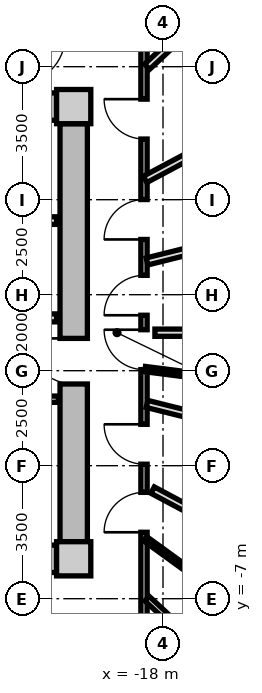
"""IFC4 building model, lengths in metres.
Left out: names, types, materials, properties, quantities, classifications, styles, units other than length and angle.
Written with IfcOpenShell. Run it as: python <this file> out.ifc"""

import sys

from ifc_helpers import new_model, si_unit, direction, frame, frame_2d, origin, origin_2d, place, context, subcontext, project, spatial, rectangle, extrude, source, transform, mapped, element, fill, save


model = new_model("IFC4")
c1 = context("Model", 3, precision=1e-05, world=origin(), true_north=direction((0.0, 1.0)))
c2 = subcontext(c1, "Body", "Model", "MODEL_VIEW")
j1 = project(units=[si_unit("LENGTHUNIT", "METRE"), si_unit("PLANEANGLEUNIT", "RADIAN")], contexts=[c1])
p1 = place(None, origin())
s1 = spatial("IfcSite", under=j1, at=p1, CompositionType="ELEMENT")
p2 = place(p1, origin())
s2 = spatial("IfcBuilding", under=s1, at=p2, CompositionType="ELEMENT")
p3 = place(p2, frame((0.0, 0.0, 126.75)))
s3 = spatial("IfcBuildingStorey", under=s2, at=p3, CompositionType="ELEMENT", Elevation=126.75)
m1 = source(origin(), c2, "Body", "SweptSolid", [
    extrude(rectangle(XDim=0.9, YDim=0.9, at=origin_2d()), origin(), (0.0, 0.0, 1.0), 3.05),
])
for number, where, z_axis, x_axis in (
    (1, (-20.35, -5.95, 0.0), (0.0, 0.0, 1.0), (1.0, 0.0, 0.0)),
    (2, (-20.35, 5.95, 0.0), (0.0, 0.0, 1.0), (1.0, 0.0, 0.0)),
):
    element("IfcColumn", number, at=place(p3, frame(where, z_axis=z_axis, x_axis=x_axis)), inside=s3, PredefinedType="COLUMN", context=c2, shape_type="MappedRepresentation", body=[
        mapped(m1, transform((0.0, 0.0, 0.0), x_axis=(1.0, 0.0, 0.0), y_axis=(0.0, 1.0, 0.0), z_axis=(0.0, 0.0, 1.0), scale=1.0)),
    ])
m2 = source(origin(), c2, "Body", "SweptSolid", [
    extrude(rectangle(XDim=14.4, YDim=0.72, at=frame_2d((7.2, 0.0))), origin(), (0.0, 0.0, 1.0), 2.73),
])
for number, where, z_axis, x_axis in (
    (3, (-35.2, 5.95, 0.0), (0.0, 0.0, 1.0), (1.0, 0.0, 0.0)),
    (4, (-20.8, -5.95, 0.0), (0.0, 0.0, 1.0), (-1.0, 0.0, 0.0)),
):
    element("IfcWall", number, at=place(p3, frame(where, z_axis=z_axis, x_axis=x_axis)), inside=s3, PredefinedType="SHEAR", context=c2, shape_type="MappedRepresentation", body=[
        mapped(m2, transform((0.0, 0.0, 0.0), x_axis=(1.0, 0.0, 0.0), y_axis=(0.0, 1.0, 0.0), z_axis=(0.0, 0.0, 1.0), scale=1.0)),
    ])
m3 = source(origin(), c2, "Body", "SweptSolid", [
    extrude(rectangle(XDim=11.0, YDim=0.72, at=frame_2d((5.5, 0.0))), origin(), (0.0, 0.0, 1.0), 2.73),
])
p4 = place(p3, frame((-20.35, 5.5, 0.0), z_axis=(0.0, 0.0, 1.0), x_axis=(0.0, -1.0, 0.0)))
e5 = element("IfcWall", 5, at=p4, inside=s3, PredefinedType="SHEAR", context=c2, shape_type="MappedRepresentation", body=[
    mapped(m3, transform((0.0, 0.0, 0.0), x_axis=(1.0, 0.0, 0.0), y_axis=(0.0, 1.0, 0.0), z_axis=(0.0, 0.0, 1.0), scale=1.0)),
])
p5 = place(p4, frame((5.65, 0.0, 0.0)))
e6 = element("IfcOpeningElement", 6, at=p5, cuts=e5, PredefinedType="OPENING", context=c2, shape_type="SweptSolid", body=[
    extrude(rectangle(XDim=1.2, YDim=2.15, at=frame_2d((0.6, 1.075))), frame((0.0, 0.37, 0.0), z_axis=(0.0, -1.0, 0.0), x_axis=(1.0, 0.0, 0.0)), (0.0, 0.0, 1.0), 0.74),
])
m4 = source(origin(), c2, "Body", "SweptSolid", [
    extrude(rectangle(XDim=3.2, YDim=0.2, at=frame_2d((1.6, 0.0))), origin(), (0.0, 0.0, 1.0), 2.715),
])
p6 = place(p3, frame((-24.0, 2.95, 0.0), z_axis=(0.0, 0.0, 1.0), x_axis=(1.0, 0.0, 0.0)))
e7 = element("IfcWall", 7, at=p6, inside=s3, PredefinedType="PARTITIONING", context=c2, shape_type="MappedRepresentation", body=[
    mapped(m4, transform((0.0, 0.0, 0.0), x_axis=(1.0, 0.0, 0.0), y_axis=(0.0, 1.0, 0.0), z_axis=(0.0, 0.0, 1.0), scale=1.0)),
])
m5 = source(origin(), c2, "Body", "SweptSolid", [
    extrude(rectangle(XDim=6.66, YDim=0.21, at=frame_2d((3.33, 0.0))), origin(), (0.0, 0.0, 1.0), 2.715),
])
p7 = place(p3, frame((-27.46, 0.39, 0.0), z_axis=(0.0, 0.0, 1.0), x_axis=(1.0, 0.0, 0.0)))
e8 = element("IfcWall", 8, at=p7, inside=s3, PredefinedType="PARTITIONING", context=c2, shape_type="MappedRepresentation", body=[
    mapped(m5, transform((0.0, 0.0, 0.0), x_axis=(1.0, 0.0, 0.0), y_axis=(0.0, 1.0, 0.0), z_axis=(0.0, 0.0, 1.0), scale=1.0)),
])
p8 = place(p7, frame((1.0, 0.0, 0.0)))
e9 = element("IfcOpeningElement", 9, at=p8, cuts=e8, PredefinedType="OPENING", context=c2, shape_type="SweptSolid", body=[
    extrude(rectangle(XDim=1.2, YDim=2.15, at=frame_2d((0.6, 1.075))), frame((0.0, 0.115, 0.0), z_axis=(0.0, -1.0, 0.0), x_axis=(1.0, 0.0, 0.0)), (0.0, 0.0, 1.0), 0.23),
])
m6 = source(origin(), c2, "Body", "SweptSolid", [
    extrude(rectangle(XDim=2.7, YDim=0.165, at=frame_2d((1.35, 0.0))), origin(), (0.0, 0.0, 1.0), 2.715),
])
p9 = place(p3, frame((-23.45, -1.75, 0.0), z_axis=(0.0, 0.0, 1.0), x_axis=(1.0, 0.0, 0.0)))
e10 = element("IfcWall", 10, at=p9, inside=s3, PredefinedType="PARTITIONING", context=c2, shape_type="MappedRepresentation", body=[
    mapped(m6, transform((0.0, 0.0, 0.0), x_axis=(1.0, 0.0, 0.0), y_axis=(0.0, 1.0, 0.0), z_axis=(0.0, 0.0, 1.0), scale=1.0)),
])
p10 = place(p9, frame((0.222, 0.0, 0.0)))
e11 = element("IfcOpeningElement", 11, at=p10, cuts=e10, PredefinedType="OPENING", context=c2, shape_type="SweptSolid", body=[
    extrude(rectangle(XDim=0.925, YDim=2.1, at=frame_2d((0.462, 1.05))), frame((0.0, 0.093, 0.0), z_axis=(0.0, -1.0, 0.0), x_axis=(1.0, 0.0, 0.0)), (0.0, 0.0, 1.0), 0.185),
])
p11 = place(p9, frame((1.522, 0.0, 0.0)))
e12 = element("IfcOpeningElement", 12, at=p11, cuts=e10, PredefinedType="OPENING", context=c2, shape_type="SweptSolid", body=[
    extrude(rectangle(XDim=0.925, YDim=2.1, at=frame_2d((0.462, 1.05))), frame((0.0, 0.093, 0.0), z_axis=(0.0, -1.0, 0.0), x_axis=(1.0, 0.0, 0.0)), (0.0, 0.0, 1.0), 0.185),
])
m7 = source(origin(), c2, "Body", "SweptSolid", [
    extrude(rectangle(XDim=15.6, YDim=0.165, at=frame_2d((7.8, 0.0))), origin(), (0.0, 0.0, 1.0), 2.715),
])
p12 = place(p3, frame((-18.5, 7.8, 0.0), z_axis=(0.0, 0.0, 1.0), x_axis=(0.0, -1.0, 0.0)))
e13 = element("IfcWall", 13, at=p12, inside=s3, PredefinedType="PARTITIONING", context=c2, shape_type="MappedRepresentation", body=[
    mapped(m7, transform((0.0, 0.0, 0.0), x_axis=(1.0, 0.0, 0.0), y_axis=(0.0, 1.0, 0.0), z_axis=(0.0, 0.0, 1.0), scale=1.0)),
])
p13 = place(p12, frame((12.002, 0.0, 0.0)))
e14 = element("IfcOpeningElement", 14, at=p13, cuts=e13, PredefinedType="OPENING", context=c2, shape_type="SweptSolid", body=[
    extrude(rectangle(XDim=1.05, YDim=2.15, at=frame_2d((0.525, 1.075))), frame((0.0, 0.093, 0.0), z_axis=(0.0, -1.0, 0.0), x_axis=(1.0, 0.0, 0.0)), (0.0, 0.0, 1.0), 0.185),
])
p14 = place(p12, frame((10.211, 0.0, 0.0)))
e15 = element("IfcOpeningElement", 15, at=p14, cuts=e13, PredefinedType="OPENING", context=c2, shape_type="SweptSolid", body=[
    extrude(rectangle(XDim=1.05, YDim=2.15, at=frame_2d((0.525, 1.075))), frame((0.0, 0.093, 0.0), z_axis=(0.0, -1.0, 0.0), x_axis=(1.0, 0.0, 0.0)), (0.0, 0.0, 1.0), 0.185),
])
p15 = place(p12, frame((7.722, 0.0, 0.0)))
e16 = element("IfcOpeningElement", 16, at=p15, cuts=e13, PredefinedType="OPENING", context=c2, shape_type="SweptSolid", body=[
    extrude(rectangle(XDim=1.05, YDim=2.15, at=frame_2d((0.525, 1.075))), frame((0.0, 0.093, 0.0), z_axis=(0.0, -1.0, 0.0), x_axis=(1.0, 0.0, 0.0)), (0.0, 0.0, 1.0), 0.185),
])
p16 = place(p12, frame((6.291, 0.0, 0.0)))
e17 = element("IfcOpeningElement", 17, at=p16, cuts=e13, PredefinedType="OPENING", context=c2, shape_type="SweptSolid", body=[
    extrude(rectangle(XDim=1.05, YDim=2.15, at=frame_2d((0.525, 1.075))), frame((0.0, 0.093, 0.0), z_axis=(0.0, -1.0, 0.0), x_axis=(1.0, 0.0, 0.0)), (0.0, 0.0, 1.0), 0.185),
])
p17 = place(p12, frame((4.296, 0.0, 0.0)))
e18 = element("IfcOpeningElement", 18, at=p17, cuts=e13, PredefinedType="OPENING", context=c2, shape_type="SweptSolid", body=[
    extrude(rectangle(XDim=1.05, YDim=2.15, at=frame_2d((0.525, 1.075))), frame((0.0, 0.093, 0.0), z_axis=(0.0, -1.0, 0.0), x_axis=(1.0, 0.0, 0.0)), (0.0, 0.0, 1.0), 0.185),
])
p18 = place(p12, frame((1.654, 0.0, 0.0)))
e19 = element("IfcOpeningElement", 19, at=p18, cuts=e13, PredefinedType="OPENING", context=c2, shape_type="SweptSolid", body=[
    extrude(rectangle(XDim=1.05, YDim=2.15, at=frame_2d((0.525, 1.075))), frame((0.0, 0.093, 0.0), z_axis=(0.0, -1.0, 0.0), x_axis=(1.0, 0.0, 0.0)), (0.0, 0.0, 1.0), 0.185),
])
m8 = source(origin(), c2, "Body", "SweptSolid", [
    extrude(rectangle(XDim=7.482, YDim=0.165, at=frame_2d((3.741, 0.0))), origin(), (0.0, 0.0, 1.0), 2.215),
])
p19 = place(p3, frame((-18.42, -6.998, 0.0), z_axis=(0.0, 0.0, 1.0), x_axis=(0.732508698043, -0.680757671489, 0.0)))
e20 = element("IfcWall", 20, at=p19, inside=s3, PredefinedType="PARTITIONING", context=c2, shape_type="MappedRepresentation", body=[
    mapped(m8, transform((0.0, 0.0, 0.0), x_axis=(1.0, 0.0, 0.0), y_axis=(0.0, 1.0, 0.0), z_axis=(0.0, 0.0, 1.0), scale=1.0)),
])
m9 = source(origin(), c2, "Body", "SweptSolid", [
    extrude(rectangle(XDim=10.556, YDim=0.19, at=frame_2d((5.278, 0.0))), origin(), (0.0, 0.0, 1.0), 2.215),
])
p20 = place(p3, frame((-18.42, -1.875, 0.0), z_axis=(0.0, 0.0, 1.0), x_axis=(0.970363857851, -0.241648470667, 0.0)))
e21 = element("IfcWall", 21, at=p20, inside=s3, PredefinedType="PARTITIONING", context=c2, shape_type="MappedRepresentation", body=[
    mapped(m9, transform((0.0, 0.0, 0.0), x_axis=(1.0, 0.0, 0.0), y_axis=(0.0, 1.0, 0.0), z_axis=(0.0, 0.0, 1.0), scale=1.0)),
])
m10 = source(origin(), c2, "Body", "SweptSolid", [
    extrude(rectangle(XDim=8.744, YDim=0.19, at=frame_2d((4.372, 0.0))), origin(), (0.0, 0.0, 1.0), 2.715),
])
p21 = place(p3, frame((-18.273, -4.142, 0.0), z_axis=(0.0, 0.0, 1.0), x_axis=(0.882252449936, -0.470776607938, 0.0)))
e22 = element("IfcWall", 22, at=p21, inside=s3, PredefinedType="PARTITIONING", context=c2, shape_type="MappedRepresentation", body=[
    mapped(m10, transform((0.0, 0.0, 0.0), x_axis=(1.0, 0.0, 0.0), y_axis=(0.0, 1.0, 0.0), z_axis=(0.0, 0.0, 1.0), scale=1.0)),
])
m11 = source(origin(), c2, "Body", "SweptSolid", [
    extrude(rectangle(XDim=3.621, YDim=0.14, at=frame_2d((1.811, 0.0))), origin(), (0.0, 0.0, 1.0), 2.715),
])
p22 = place(p3, frame((-18.47, -5.422, 0.0), z_axis=(0.0, 0.0, 1.0), x_axis=(0.80968252222, -0.586868139544, 0.0)))
e23 = element("IfcWall", 23, at=p22, inside=s3, PredefinedType="PARTITIONING", context=c2, shape_type="MappedRepresentation", body=[
    mapped(m11, transform((0.0, 0.0, 0.0), x_axis=(1.0, 0.0, 0.0), y_axis=(0.0, 1.0, 0.0), z_axis=(0.0, 0.0, 1.0), scale=1.0)),
])
p23 = place(p22, frame((1.351, 0.0, 0.0)))
e24 = element("IfcOpeningElement", 24, at=p23, cuts=e23, PredefinedType="OPENING", context=c2, shape_type="SweptSolid", body=[
    extrude(rectangle(XDim=0.92, YDim=2.1, at=frame_2d((0.46, 1.05))), frame((0.0, 0.08, 0.0), z_axis=(0.0, -1.0, 0.0), x_axis=(1.0, 0.0, 0.0)), (0.0, 0.0, 1.0), 0.16),
])
p24 = place(p3, frame((-18.42, 1.875, 0.0), z_axis=(0.0, 0.0, 1.0), x_axis=(0.970363857851, 0.241648470667, 0.0)))
e25 = element("IfcWall", 25, at=p24, inside=s3, PredefinedType="PARTITIONING", context=c2, shape_type="MappedRepresentation", body=[
    mapped(m9, transform((0.0, 0.0, 0.0), x_axis=(1.0, 0.0, 0.0), y_axis=(0.0, 1.0, 0.0), z_axis=(0.0, 0.0, 1.0), scale=1.0)),
])
m12 = source(origin(), c2, "Body", "SweptSolid", [
    extrude(rectangle(XDim=10.036, YDim=0.19, at=frame_2d((5.018, 0.0))), origin(), (0.0, 0.0, 1.0), 2.715),
])
p25 = place(p3, frame((-18.213, 0.0, 0.0), z_axis=(0.0, 0.0, 1.0), x_axis=(1.0, 0.0, 0.0)))
e26 = element("IfcWall", 26, at=p25, inside=s3, PredefinedType="PARTITIONING", context=c2, shape_type="MappedRepresentation", body=[
    mapped(m12, transform((0.0, 0.0, 0.0), x_axis=(1.0, 0.0, 0.0), y_axis=(0.0, 1.0, 0.0), z_axis=(0.0, 0.0, 1.0), scale=1.0)),
])
m13 = source(origin(), c2, "Body", "SweptSolid", [
    extrude(rectangle(XDim=4.562, YDim=0.14, at=frame_2d((2.281, 0.0))), origin(), (0.0, 0.0, 1.0), 2.715),
])
p26 = place(p3, frame((-18.47, -0.958, 0.0), z_axis=(0.0, 0.0, 1.0), x_axis=(0.991904666356, -0.126984774129, 0.0)))
e27 = element("IfcWall", 27, at=p26, inside=s3, PredefinedType="PARTITIONING", context=c2, shape_type="MappedRepresentation", body=[
    mapped(m13, transform((0.0, 0.0, 0.0), x_axis=(1.0, 0.0, 0.0), y_axis=(0.0, 1.0, 0.0), z_axis=(0.0, 0.0, 1.0), scale=1.0)),
])
p27 = place(p26, frame((1.821, 0.0, 0.0)))
e28 = element("IfcOpeningElement", 28, at=p27, cuts=e27, PredefinedType="OPENING", context=c2, shape_type="SweptSolid", body=[
    extrude(rectangle(XDim=0.92, YDim=2.1, at=frame_2d((0.46, 1.05))), frame((0.0, 0.08, 0.0), z_axis=(0.0, -1.0, 0.0), x_axis=(1.0, 0.0, 0.0)), (0.0, 0.0, 1.0), 0.16),
])
m14 = source(origin(), c2, "Body", "SweptSolid", [
    extrude(rectangle(XDim=7.482, YDim=0.19, at=frame_2d((3.741, 0.0))), origin(), (0.0, 0.0, 1.0), 2.215),
])
p28 = place(p3, frame((-18.42, 6.998, 0.0), z_axis=(0.0, 0.0, 1.0), x_axis=(0.732508698043, 0.680757671489, 0.0)))
e29 = element("IfcWall", 29, at=p28, inside=s3, PredefinedType="PARTITIONING", context=c2, shape_type="MappedRepresentation", body=[
    mapped(m14, transform((0.0, 0.0, 0.0), x_axis=(1.0, 0.0, 0.0), y_axis=(0.0, 1.0, 0.0), z_axis=(0.0, 0.0, 1.0), scale=1.0)),
])
m15 = source(origin(), c2, "Body", "SweptSolid", [
    extrude(rectangle(XDim=8.968, YDim=0.19, at=frame_2d((4.484, 0.0))), origin(), (0.0, 0.0, 1.0), 2.715),
])
p29 = place(p3, frame((-18.47, 4.036, 0.0), z_axis=(0.0, 0.0, 1.0), x_axis=(0.882202936563, 0.47086938605, 0.0)))
e30 = element("IfcWall", 30, at=p29, inside=s3, PredefinedType="PARTITIONING", context=c2, shape_type="MappedRepresentation", body=[
    mapped(m15, transform((0.0, 0.0, 0.0), x_axis=(1.0, 0.0, 0.0), y_axis=(0.0, 1.0, 0.0), z_axis=(0.0, 0.0, 1.0), scale=1.0)),
])
m16 = source(origin(), c2, "Body", "SweptSolid", [
    extrude(rectangle(XDim=1.2, YDim=2.15, at=frame_2d((0.6, 1.075))), frame((0.0, 0.025, 0.0), z_axis=(0.0, -1.0, 0.0), x_axis=(1.0, 0.0, 0.0)), (0.0, 0.0, 1.0), 0.05),
])
p30 = place(p5, frame((1.2, 0.0, 0.0), z_axis=(0.0, 0.0, 1.0), x_axis=(-1.0, 0.0, 0.0)))
e31 = element("IfcDoor", 31, at=p30, inside=s3, OperationType="SINGLE_SWING_RIGHT", PredefinedType="DOOR", context=c2, shape_type="MappedRepresentation", body=[
    mapped(m16, transform((0.0, 0.0, 0.0), x_axis=(1.0, 0.0, 0.0), y_axis=(0.0, 1.0, 0.0), z_axis=(0.0, 0.0, 1.0), scale=1.0)),
])
fill(e6, e31)
m17 = source(origin(), c2, "Body", "SweptSolid", [
    extrude(rectangle(XDim=1.05, YDim=2.15, at=frame_2d((0.525, 1.075))), frame((0.0, 0.025, 0.0), z_axis=(0.0, -1.0, 0.0), x_axis=(1.0, 0.0, 0.0)), (0.0, 0.0, 1.0), 0.05),
])
p31 = place(p13, frame((1.05, 0.0, 0.0), z_axis=(0.0, 0.0, 1.0), x_axis=(-1.0, 0.0, 0.0)))
e32 = element("IfcDoor", 32, at=p31, inside=s3, OperationType="SINGLE_SWING_LEFT", PredefinedType="DOOR", context=c2, shape_type="MappedRepresentation", body=[
    mapped(m17, transform((0.0, 0.0, 0.0), x_axis=(1.0, 0.0, 0.0), y_axis=(0.0, 1.0, 0.0), z_axis=(0.0, 0.0, 1.0), scale=1.0)),
])
fill(e14, e32)
p32 = place(p14, frame((1.05, 0.0, 0.0), z_axis=(0.0, 0.0, 1.0), x_axis=(-1.0, 0.0, 0.0)))
e33 = element("IfcDoor", 33, at=p32, inside=s3, OperationType="SINGLE_SWING_RIGHT", PredefinedType="DOOR", context=c2, shape_type="MappedRepresentation", body=[
    mapped(m17, transform((0.0, 0.0, 0.0), x_axis=(1.0, 0.0, 0.0), y_axis=(0.0, 1.0, 0.0), z_axis=(0.0, 0.0, 1.0), scale=1.0)),
])
fill(e15, e33)
p33 = place(p15, frame((1.05, 0.0, 0.0), z_axis=(0.0, 0.0, 1.0), x_axis=(-1.0, 0.0, 0.0)))
e34 = element("IfcDoor", 34, at=p33, inside=s3, OperationType="SINGLE_SWING_RIGHT", PredefinedType="DOOR", context=c2, shape_type="MappedRepresentation", body=[
    mapped(m17, transform((0.0, 0.0, 0.0), x_axis=(1.0, 0.0, 0.0), y_axis=(0.0, 1.0, 0.0), z_axis=(0.0, 0.0, 1.0), scale=1.0)),
])
fill(e16, e34)
p34 = place(p16, frame((1.05, 0.0, 0.0), z_axis=(0.0, 0.0, 1.0), x_axis=(-1.0, 0.0, 0.0)))
e35 = element("IfcDoor", 35, at=p34, inside=s3, OperationType="SINGLE_SWING_LEFT", PredefinedType="DOOR", context=c2, shape_type="MappedRepresentation", body=[
    mapped(m17, transform((0.0, 0.0, 0.0), x_axis=(1.0, 0.0, 0.0), y_axis=(0.0, 1.0, 0.0), z_axis=(0.0, 0.0, 1.0), scale=1.0)),
])
fill(e17, e35)
p35 = place(p17, frame((1.05, 0.0, 0.0), z_axis=(0.0, 0.0, 1.0), x_axis=(-1.0, 0.0, 0.0)))
e36 = element("IfcDoor", 36, at=p35, inside=s3, OperationType="SINGLE_SWING_LEFT", PredefinedType="DOOR", context=c2, shape_type="MappedRepresentation", body=[
    mapped(m17, transform((0.0, 0.0, 0.0), x_axis=(1.0, 0.0, 0.0), y_axis=(0.0, 1.0, 0.0), z_axis=(0.0, 0.0, 1.0), scale=1.0)),
])
fill(e18, e36)
p36 = place(p18, frame((1.05, 0.0, 0.0), z_axis=(0.0, 0.0, 1.0), x_axis=(-1.0, 0.0, 0.0)))
e37 = element("IfcDoor", 37, at=p36, inside=s3, OperationType="SINGLE_SWING_RIGHT", PredefinedType="DOOR", context=c2, shape_type="MappedRepresentation", body=[
    mapped(m17, transform((0.0, 0.0, 0.0), x_axis=(1.0, 0.0, 0.0), y_axis=(0.0, 1.0, 0.0), z_axis=(0.0, 0.0, 1.0), scale=1.0)),
])
fill(e19, e37)
save(model, sys.argv[1])
